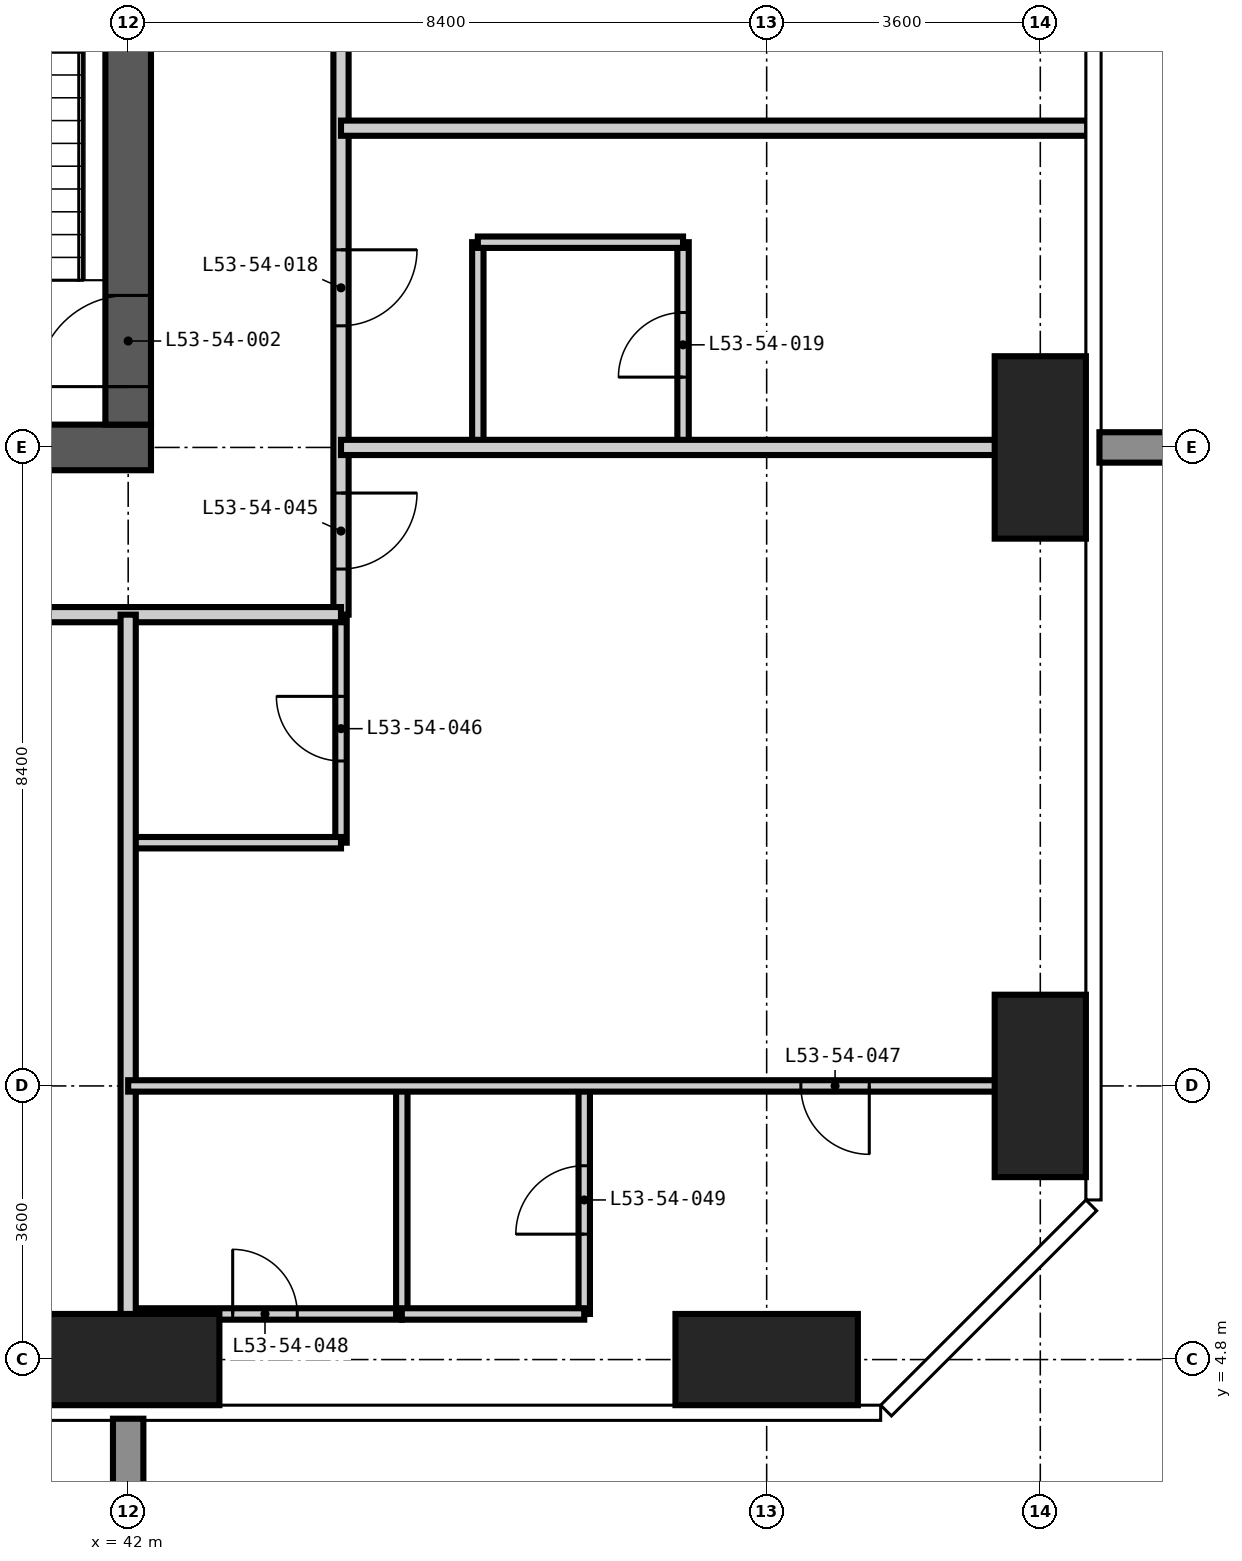
"""IFC4 building model, lengths in metres.
Left out: names, types, materials, properties, quantities, classifications, styles, units other than length and angle.
Written with IfcOpenShell. Run it as: python <this file> out.ifc"""

import sys

from ifc_helpers import new_model, si_unit, direction, frame, frame_2d, origin, origin_2d, place, context, subcontext, project, spatial, rectangle, extrude, element, fill, save


model = new_model("IFC4")
c1 = context("Model", 3, precision=1e-05, world=origin(), true_north=direction((0.0, 1.0)))
c2 = subcontext(c1, "Body", "Model", "MODEL_VIEW")
j1 = project(units=[si_unit("LENGTHUNIT", "METRE"), si_unit("PLANEANGLEUNIT", "RADIAN")], contexts=[c1])
p1 = place(None, origin())
s1 = spatial("IfcSite", under=j1, at=p1, CompositionType="ELEMENT")
p2 = place(p1, origin())
s2 = spatial("IfcBuilding", under=s1, at=p2, CompositionType="ELEMENT")
p3 = place(p2, frame((0.0, 0.0, 205.8)))
s3 = spatial("IfcBuildingStorey", under=s2, at=p3, CompositionType="ELEMENT", Elevation=205.8)
for number, where, z_axis, x_axis in (
    (1, (42.0, 4.8, -0.35), (0.0, 0.0, 1.0), (1.0, 0.0, 0.0)),
    (2, (50.4, 4.8, -0.35), (0.0, 0.0, 1.0), (1.0, 0.0, 0.0)),
):
    element("IfcColumn", number, at=place(p3, frame(where, z_axis=z_axis, x_axis=x_axis)), inside=s3, PredefinedType="COLUMN", context=c2, shape_type="SweptSolid", body=[
        extrude(rectangle(XDim=2.4, YDim=1.2, at=origin_2d()), origin(), (0.0, 0.0, 1.0), 3.6),
    ])
for number, where, z_axis, x_axis in (
    (3, (54.0, 8.4, -0.35), (0.0, 0.0, 1.0), (1.0, 0.0, 0.0)),
    (4, (54.0, 16.8, -0.35), (0.0, 0.0, 1.0), (1.0, 0.0, 0.0)),
):
    element("IfcColumn", number, at=place(p3, frame(where, z_axis=z_axis, x_axis=x_axis)), inside=s3, PredefinedType="COLUMN", context=c2, shape_type="SweptSolid", body=[
        extrude(rectangle(XDim=1.2, YDim=2.4, at=origin_2d()), origin(), (0.0, 0.0, 1.0), 3.6),
    ])
p4 = place(p3, frame((16.5, 16.8, -0.35), z_axis=(0.0, 0.0, 1.0), x_axis=(1.0, 0.0, 0.0)))
e5 = element("IfcWall", 5, at=p4, inside=s3, PredefinedType="SHEAR", context=c2, shape_type="SweptSolid", body=[
    extrude(rectangle(XDim=25.8, YDim=0.6, at=frame_2d((12.9, 0.0))), origin(), (0.0, 0.0, 1.0), 3.6),
])
p5 = place(p4, frame((12.4, 0.0, 0.35)))
e6 = element("IfcOpeningElement", 6, at=p5, cuts=e5, PredefinedType="OPENING", context=c2, shape_type="SweptSolid", body=[
    extrude(rectangle(XDim=1.0, YDim=2.1, at=frame_2d((0.5, 1.05))), frame((0.0, 0.31, 0.0), z_axis=(0.0, -1.0, 0.0), x_axis=(1.0, 0.0, 0.0)), (0.0, 0.0, 1.0), 0.62),
])
p6 = place(p4, frame((18.7, 0.0, 0.35)))
e7 = element("IfcOpeningElement", 7, at=p6, cuts=e5, PredefinedType="OPENING", context=c2, shape_type="SweptSolid", body=[
    extrude(rectangle(XDim=1.0, YDim=2.1, at=frame_2d((0.5, 1.05))), frame((0.0, 0.31, 0.0), z_axis=(0.0, -1.0, 0.0), x_axis=(1.0, 0.0, 0.0)), (0.0, 0.0, 1.0), 0.62),
])
p7 = place(p3, frame((42.0, 17.1, -0.35), z_axis=(0.0, 0.0, 1.0), x_axis=(0.0, 1.0, 0.0)))
e8 = element("IfcWall", 8, at=p7, inside=s3, PredefinedType="SHEAR", context=c2, shape_type="SweptSolid", body=[
    extrude(rectangle(XDim=24.6, YDim=0.6, at=frame_2d((12.3, 0.0))), origin(), (0.0, 0.0, 1.0), 3.6),
])
p8 = place(p7, frame((0.5, 0.0, 0.35)))
e9 = element("IfcOpeningElement", 9, at=p8, cuts=e8, PredefinedType="OPENING", context=c2, shape_type="SweptSolid", body=[
    extrude(rectangle(XDim=1.2, YDim=2.2, at=frame_2d((0.6, 1.1))), frame((0.0, 0.31, 0.0), z_axis=(0.0, -1.0, 0.0), x_axis=(1.0, 0.0, 0.0)), (0.0, 0.0, 1.0), 0.62),
])
p9 = place(p7, frame((11.8, 0.0, 0.35)))
e10 = element("IfcOpeningElement", 10, at=p9, cuts=e8, PredefinedType="OPENING", context=c2, shape_type="SweptSolid", body=[
    extrude(rectangle(XDim=1.0, YDim=2.1, at=frame_2d((0.5, 1.05))), frame((0.0, 0.31, 0.0), z_axis=(0.0, -1.0, 0.0), x_axis=(1.0, 0.0, 0.0)), (0.0, 0.0, 1.0), 0.62),
])
p10 = place(p7, frame((20.2, 0.0, 0.35)))
e11 = element("IfcOpeningElement", 11, at=p10, cuts=e8, PredefinedType="OPENING", context=c2, shape_type="SweptSolid", body=[
    extrude(rectangle(XDim=1.0, YDim=2.1, at=frame_2d((0.5, 1.05))), frame((0.0, 0.31, 0.0), z_axis=(0.0, -1.0, 0.0), x_axis=(1.0, 0.0, 0.0)), (0.0, 0.0, 1.0), 0.62),
])
p11 = place(p3, frame((44.8, 11.6, 0.0), z_axis=(0.0, 0.0, 1.0), x_axis=(0.0, 1.0, 0.0)))
e12 = element("IfcWall", 12, at=p11, inside=s3, PredefinedType="PARTITIONING", context=c2, shape_type="SweptSolid", body=[
    extrude(rectangle(XDim=3.0, YDim=0.15, at=frame_2d((1.5, 0.0))), origin(), (0.0, 0.0, 1.0), 3.25),
])
p12 = place(p11, frame((1.075, 0.0, 0.0)))
e13 = element("IfcOpeningElement", 13, at=p12, cuts=e12, PredefinedType="OPENING", context=c2, shape_type="SweptSolid", body=[
    extrude(rectangle(XDim=0.85, YDim=2.1, at=frame_2d((0.425, 1.05))), frame((0.0, 0.085, 0.0), z_axis=(0.0, -1.0, 0.0), x_axis=(1.0, 0.0, 0.0)), (0.0, 0.0, 1.0), 0.17),
])
p13 = place(p3, frame((46.6, 16.8, 0.0), z_axis=(0.0, 0.0, 1.0), x_axis=(0.0, 1.0, 0.0)))
e14 = element("IfcWall", 14, at=p13, inside=s3, PredefinedType="PARTITIONING", context=c2, shape_type="SweptSolid", body=[
    extrude(rectangle(XDim=2.7, YDim=0.15, at=frame_2d((1.35, 0.0))), origin(), (0.0, 0.0, 1.0), 3.25),
])
p14 = place(p3, frame((49.3, 16.8, 0.0), z_axis=(0.0, 0.0, 1.0), x_axis=(0.0, 1.0, 0.0)))
e15 = element("IfcWall", 15, at=p14, inside=s3, PredefinedType="PARTITIONING", context=c2, shape_type="SweptSolid", body=[
    extrude(rectangle(XDim=2.7, YDim=0.15, at=frame_2d((1.35, 0.0))), origin(), (0.0, 0.0, 1.0), 3.25),
])
p15 = place(p14, frame((0.925, 0.0, 0.0)))
e16 = element("IfcOpeningElement", 16, at=p15, cuts=e15, PredefinedType="OPENING", context=c2, shape_type="SweptSolid", body=[
    extrude(rectangle(XDim=0.85, YDim=2.1, at=frame_2d((0.425, 1.05))), frame((0.0, 0.085, 0.0), z_axis=(0.0, -1.0, 0.0), x_axis=(1.0, 0.0, 0.0)), (0.0, 0.0, 1.0), 0.17),
])
p16 = place(p3, frame((42.0, 5.4, 0.0), z_axis=(0.0, 0.0, 1.0), x_axis=(1.0, 0.0, 0.0)))
e17 = element("IfcWall", 17, at=p16, inside=s3, PredefinedType="PARTITIONING", context=c2, shape_type="SweptSolid", body=[
    extrude(rectangle(XDim=3.6, YDim=0.15, at=frame_2d((1.8, 0.0))), origin(), (0.0, 0.0, 1.0), 3.25),
])
p17 = place(p16, frame((1.375, 0.0, 0.0)))
e18 = element("IfcOpeningElement", 18, at=p17, cuts=e17, PredefinedType="OPENING", context=c2, shape_type="SweptSolid", body=[
    extrude(rectangle(XDim=0.85, YDim=2.1, at=frame_2d((0.425, 1.05))), frame((0.0, 0.085, 0.0), z_axis=(0.0, -1.0, 0.0), x_axis=(1.0, 0.0, 0.0)), (0.0, 0.0, 1.0), 0.17),
])
p18 = place(p3, frame((42.0, 11.6, 0.0), z_axis=(0.0, 0.0, 1.0), x_axis=(1.0, 0.0, 0.0)))
e19 = element("IfcWall", 19, at=p18, inside=s3, PredefinedType="PARTITIONING", context=c2, shape_type="SweptSolid", body=[
    extrude(rectangle(XDim=2.8, YDim=0.15, at=frame_2d((1.4, 0.0))), origin(), (0.0, 0.0, 1.0), 3.25),
])
p19 = place(p3, frame((46.6, 19.5, 0.0), z_axis=(0.0, 0.0, 1.0), x_axis=(1.0, 0.0, 0.0)))
e20 = element("IfcWall", 20, at=p19, inside=s3, PredefinedType="PARTITIONING", context=c2, shape_type="SweptSolid", body=[
    extrude(rectangle(XDim=2.7, YDim=0.15, at=frame_2d((1.35, 0.0))), origin(), (0.0, 0.0, 1.0), 3.25),
])
p20 = place(p3, frame((44.8, 45.4, 0.0), z_axis=(0.0, 0.0, 1.0), x_axis=(0.0, -1.0, 0.0)))
e21 = element("IfcWall", 21, at=p20, inside=s3, PredefinedType="PARTITIONING", context=c2, shape_type="SweptSolid", body=[
    extrude(rectangle(XDim=30.8, YDim=0.2, at=frame_2d((15.4, 0.0))), origin(), (0.0, 0.0, 1.0), 3.25),
])
p21 = place(p20, frame((26.0, 0.0, 0.0)))
e22 = element("IfcOpeningElement", 22, at=p21, cuts=e21, PredefinedType="OPENING", context=c2, shape_type="SweptSolid", body=[
    extrude(rectangle(XDim=1.0, YDim=2.2, at=frame_2d((0.5, 1.1))), frame((0.0, 0.11, 0.0), z_axis=(0.0, -1.0, 0.0), x_axis=(1.0, 0.0, 0.0)), (0.0, 0.0, 1.0), 0.22),
])
p22 = place(p20, frame((21.8, 0.0, 0.0)))
e23 = element("IfcOpeningElement", 23, at=p22, cuts=e21, PredefinedType="OPENING", context=c2, shape_type="SweptSolid", body=[
    extrude(rectangle(XDim=1.0, YDim=2.2, at=frame_2d((0.5, 1.1))), frame((0.0, 0.11, 0.0), z_axis=(0.0, -1.0, 0.0), x_axis=(1.0, 0.0, 0.0)), (0.0, 0.0, 1.0), 0.22),
])
p23 = place(p20, frame((16.7, 0.0, 0.0)))
e24 = element("IfcOpeningElement", 24, at=p23, cuts=e21, PredefinedType="OPENING", context=c2, shape_type="SweptSolid", body=[
    extrude(rectangle(XDim=1.0, YDim=2.2, at=frame_2d((0.5, 1.1))), frame((0.0, 0.11, 0.0), z_axis=(0.0, -1.0, 0.0), x_axis=(1.0, 0.0, 0.0)), (0.0, 0.0, 1.0), 0.22),
])
p24 = place(p20, frame((5.0, 0.0, 0.0)))
e25 = element("IfcOpeningElement", 25, at=p24, cuts=e21, PredefinedType="OPENING", context=c2, shape_type="SweptSolid", body=[
    extrude(rectangle(XDim=1.0, YDim=2.2, at=frame_2d((0.5, 1.1))), frame((0.0, 0.11, 0.0), z_axis=(0.0, -1.0, 0.0), x_axis=(1.0, 0.0, 0.0)), (0.0, 0.0, 1.0), 0.22),
])
p25 = place(p20, frame((29.2, 0.0, 0.0)))
e26 = element("IfcOpeningElement", 26, at=p25, cuts=e21, PredefinedType="OPENING", context=c2, shape_type="SweptSolid", body=[
    extrude(rectangle(XDim=1.0, YDim=2.2, at=frame_2d((0.5, 1.1))), frame((0.0, 0.11, 0.0), z_axis=(0.0, -1.0, 0.0), x_axis=(1.0, 0.0, 0.0)), (0.0, 0.0, 1.0), 0.22),
])
p26 = place(p20, frame((1.2, 0.0, 0.0)))
e27 = element("IfcOpeningElement", 27, at=p26, cuts=e21, PredefinedType="OPENING", context=c2, shape_type="SweptSolid", body=[
    extrude(rectangle(XDim=1.0, YDim=2.2, at=frame_2d((0.5, 1.1))), frame((0.0, 0.11, 0.0), z_axis=(0.0, -1.0, 0.0), x_axis=(1.0, 0.0, 0.0)), (0.0, 0.0, 1.0), 0.22),
])
p27 = place(p3, frame((44.8, 14.6, 0.0), z_axis=(0.0, 0.0, 1.0), x_axis=(-1.0, 0.0, 0.0)))
e28 = element("IfcWall", 28, at=p27, inside=s3, PredefinedType="PARTITIONING", context=c2, shape_type="SweptSolid", body=[
    extrude(rectangle(XDim=30.2, YDim=0.2, at=frame_2d((15.1, 0.0))), origin(), (0.0, 0.0, 1.0), 3.25),
])
p28 = place(p27, frame((24.5, 0.0, 0.0)))
e29 = element("IfcOpeningElement", 29, at=p28, cuts=e28, PredefinedType="OPENING", context=c2, shape_type="SweptSolid", body=[
    extrude(rectangle(XDim=1.0, YDim=2.2, at=frame_2d((0.5, 1.1))), frame((0.0, 0.11, 0.0), z_axis=(0.0, -1.0, 0.0), x_axis=(1.0, 0.0, 0.0)), (0.0, 0.0, 1.0), 0.22),
])
p29 = place(p27, frame((12.8, 0.0, 0.0)))
e30 = element("IfcOpeningElement", 30, at=p29, cuts=e28, PredefinedType="OPENING", context=c2, shape_type="SweptSolid", body=[
    extrude(rectangle(XDim=1.0, YDim=2.2, at=frame_2d((0.5, 1.1))), frame((0.0, 0.11, 0.0), z_axis=(0.0, -1.0, 0.0), x_axis=(1.0, 0.0, 0.0)), (0.0, 0.0, 1.0), 0.22),
])
p30 = place(p27, frame((6.5, 0.0, 0.0)))
e31 = element("IfcOpeningElement", 31, at=p30, cuts=e28, PredefinedType="OPENING", context=c2, shape_type="SweptSolid", body=[
    extrude(rectangle(XDim=1.0, YDim=2.2, at=frame_2d((0.5, 1.1))), frame((0.0, 0.11, 0.0), z_axis=(0.0, -1.0, 0.0), x_axis=(1.0, 0.0, 0.0)), (0.0, 0.0, 1.0), 0.22),
])
p31 = place(p3, frame((42.0, 4.182, 0.0), z_axis=(0.0, 0.0, 1.0), x_axis=(0.0, 1.0, 0.0)))
e32 = element("IfcWall", 32, at=p31, inside=s3, PredefinedType="PARTITIONING", context=c2, shape_type="SweptSolid", body=[
    extrude(rectangle(XDim=10.418, YDim=0.2, at=frame_2d((5.209, 0.0))), origin(), (0.0, 0.0, 1.0), 3.25),
])
for number, where, z_axis, x_axis in (
    (33, (44.8, 16.8, 0.0), (0.0, 0.0, 1.0), (1.0, 0.0, 0.0)),
    (34, (44.8, 21.0, 0.0), (0.0, 0.0, 1.0), (1.0, 0.0, 0.0)),
):
    element("IfcWall", number, at=place(p3, frame(where, z_axis=z_axis, x_axis=x_axis)), inside=s3, PredefinedType="PARTITIONING", context=c2, shape_type="SweptSolid", body=[
        extrude(rectangle(XDim=9.818, YDim=0.2, at=frame_2d((4.909, 0.0))), origin(), (0.0, 0.0, 1.0), 3.25),
    ])
p32 = place(p3, frame((45.6, 5.4, 0.0), z_axis=(0.0, 0.0, 1.0), x_axis=(0.0, 1.0, 0.0)))
e35 = element("IfcWall", 35, at=p32, inside=s3, PredefinedType="PARTITIONING", context=c2, shape_type="SweptSolid", body=[
    extrude(rectangle(XDim=3.0, YDim=0.15, at=frame_2d((1.5, 0.0))), origin(), (0.0, 0.0, 1.0), 3.25),
])
p33 = place(p3, frame((48.0, 5.4, 0.0), z_axis=(0.0, 0.0, 1.0), x_axis=(0.0, 1.0, 0.0)))
e36 = element("IfcWall", 36, at=p33, inside=s3, PredefinedType="PARTITIONING", context=c2, shape_type="SweptSolid", body=[
    extrude(rectangle(XDim=3.0, YDim=0.15, at=frame_2d((1.5, 0.0))), origin(), (0.0, 0.0, 1.0), 3.25),
])
p34 = place(p33, frame((1.05, 0.0, 0.0)))
e37 = element("IfcOpeningElement", 37, at=p34, cuts=e36, PredefinedType="OPENING", context=c2, shape_type="SweptSolid", body=[
    extrude(rectangle(XDim=0.9, YDim=2.1, at=frame_2d((0.45, 1.05))), frame((0.0, 0.085, 0.0), z_axis=(0.0, -1.0, 0.0), x_axis=(1.0, 0.0, 0.0)), (0.0, 0.0, 1.0), 0.17),
])
p35 = place(p3, frame((45.6, 5.4, 0.0), z_axis=(0.0, 0.0, 1.0), x_axis=(1.0, 0.0, 0.0)))
e38 = element("IfcWall", 38, at=p35, inside=s3, PredefinedType="PARTITIONING", context=c2, shape_type="SweptSolid", body=[
    extrude(rectangle(XDim=2.4, YDim=0.15, at=frame_2d((1.2, 0.0))), origin(), (0.0, 0.0, 1.0), 3.25),
])
p36 = place(p3, frame((42.0, 8.4, 0.0), z_axis=(0.0, 0.0, 1.0), x_axis=(1.0, 0.0, 0.0)))
e39 = element("IfcWall", 39, at=p36, inside=s3, PredefinedType="PARTITIONING", context=c2, shape_type="SweptSolid", body=[
    extrude(rectangle(XDim=12.618, YDim=0.15, at=frame_2d((6.309, 0.0))), origin(), (0.0, 0.0, 1.0), 3.25),
])
p37 = place(p36, frame((8.85, 0.0, 0.0)))
e40 = element("IfcOpeningElement", 40, at=p37, cuts=e39, PredefinedType="OPENING", context=c2, shape_type="SweptSolid", body=[
    extrude(rectangle(XDim=0.9, YDim=2.1, at=frame_2d((0.45, 1.05))), frame((0.0, 0.085, 0.0), z_axis=(0.0, -1.0, 0.0), x_axis=(1.0, 0.0, 0.0)), (0.0, 0.0, 1.0), 0.17),
])
p38 = place(p8, origin())
e41 = element("IfcDoor", 41, at=p38, inside=s3, OperationType="SINGLE_SWING_LEFT", PredefinedType="DOOR", context=c2, shape_type="SweptSolid", body=[
    extrude(rectangle(XDim=1.2, YDim=2.2, at=frame_2d((0.6, 1.1))), frame((0.0, 0.025, 0.0), z_axis=(0.0, -1.0, 0.0), x_axis=(1.0, 0.0, 0.0)), (0.0, 0.0, 1.0), 0.05),
])
fill(e9, e41)
p39 = place(p21, origin())
e42 = element("IfcDoor", 42, at=p39, inside=s3, OperationType="SINGLE_SWING_LEFT", PredefinedType="DOOR", context=c2, shape_type="SweptSolid", body=[
    extrude(rectangle(XDim=1.0, YDim=2.2, at=frame_2d((0.5, 1.1))), frame((0.0, 0.025, 0.0), z_axis=(0.0, -1.0, 0.0), x_axis=(1.0, 0.0, 0.0)), (0.0, 0.0, 1.0), 0.05),
])
fill(e22, e42)
p40 = place(p15, origin())
e43 = element("IfcDoor", 43, at=p40, inside=s3, OperationType="SINGLE_SWING_LEFT", PredefinedType="DOOR", context=c2, shape_type="SweptSolid", body=[
    extrude(rectangle(XDim=0.85, YDim=2.1, at=frame_2d((0.425, 1.05))), frame((0.0, 0.025, 0.0), z_axis=(0.0, -1.0, 0.0), x_axis=(1.0, 0.0, 0.0)), (0.0, 0.0, 1.0), 0.05),
])
fill(e16, e43)
p41 = place(p25, origin())
e44 = element("IfcDoor", 44, at=p41, inside=s3, OperationType="SINGLE_SWING_LEFT", PredefinedType="DOOR", context=c2, shape_type="SweptSolid", body=[
    extrude(rectangle(XDim=1.0, YDim=2.2, at=frame_2d((0.5, 1.1))), frame((0.0, 0.025, 0.0), z_axis=(0.0, -1.0, 0.0), x_axis=(1.0, 0.0, 0.0)), (0.0, 0.0, 1.0), 0.05),
])
fill(e26, e44)
p42 = place(p12, origin())
e45 = element("IfcDoor", 45, at=p42, inside=s3, OperationType="SINGLE_SWING_RIGHT", PredefinedType="DOOR", context=c2, shape_type="SweptSolid", body=[
    extrude(rectangle(XDim=0.85, YDim=2.1, at=frame_2d((0.425, 1.05))), frame((0.0, 0.025, 0.0), z_axis=(0.0, -1.0, 0.0), x_axis=(1.0, 0.0, 0.0)), (0.0, 0.0, 1.0), 0.05),
])
fill(e13, e45)
p43 = place(p37, frame((0.9, 0.0, 0.0), z_axis=(0.0, 0.0, 1.0), x_axis=(-1.0, 0.0, 0.0)))
e46 = element("IfcDoor", 46, at=p43, inside=s3, OperationType="SINGLE_SWING_LEFT", PredefinedType="DOOR", context=c2, shape_type="SweptSolid", body=[
    extrude(rectangle(XDim=0.9, YDim=2.1, at=frame_2d((0.45, 1.05))), frame((0.0, 0.025, 0.0), z_axis=(0.0, -1.0, 0.0), x_axis=(1.0, 0.0, 0.0)), (0.0, 0.0, 1.0), 0.05),
])
fill(e40, e46)
p44 = place(p17, origin())
e47 = element("IfcDoor", 47, at=p44, inside=s3, OperationType="SINGLE_SWING_LEFT", PredefinedType="DOOR", context=c2, shape_type="SweptSolid", body=[
    extrude(rectangle(XDim=0.85, YDim=2.1, at=frame_2d((0.425, 1.05))), frame((0.0, 0.025, 0.0), z_axis=(0.0, -1.0, 0.0), x_axis=(1.0, 0.0, 0.0)), (0.0, 0.0, 1.0), 0.05),
])
fill(e18, e47)
p45 = place(p34, origin())
e48 = element("IfcDoor", 48, at=p45, inside=s3, OperationType="SINGLE_SWING_LEFT", PredefinedType="DOOR", context=c2, shape_type="SweptSolid", body=[
    extrude(rectangle(XDim=0.9, YDim=2.1, at=frame_2d((0.45, 1.05))), frame((0.0, 0.025, 0.0), z_axis=(0.0, -1.0, 0.0), x_axis=(1.0, 0.0, 0.0)), (0.0, 0.0, 1.0), 0.05),
])
fill(e37, e48)
save(model, sys.argv[1])
